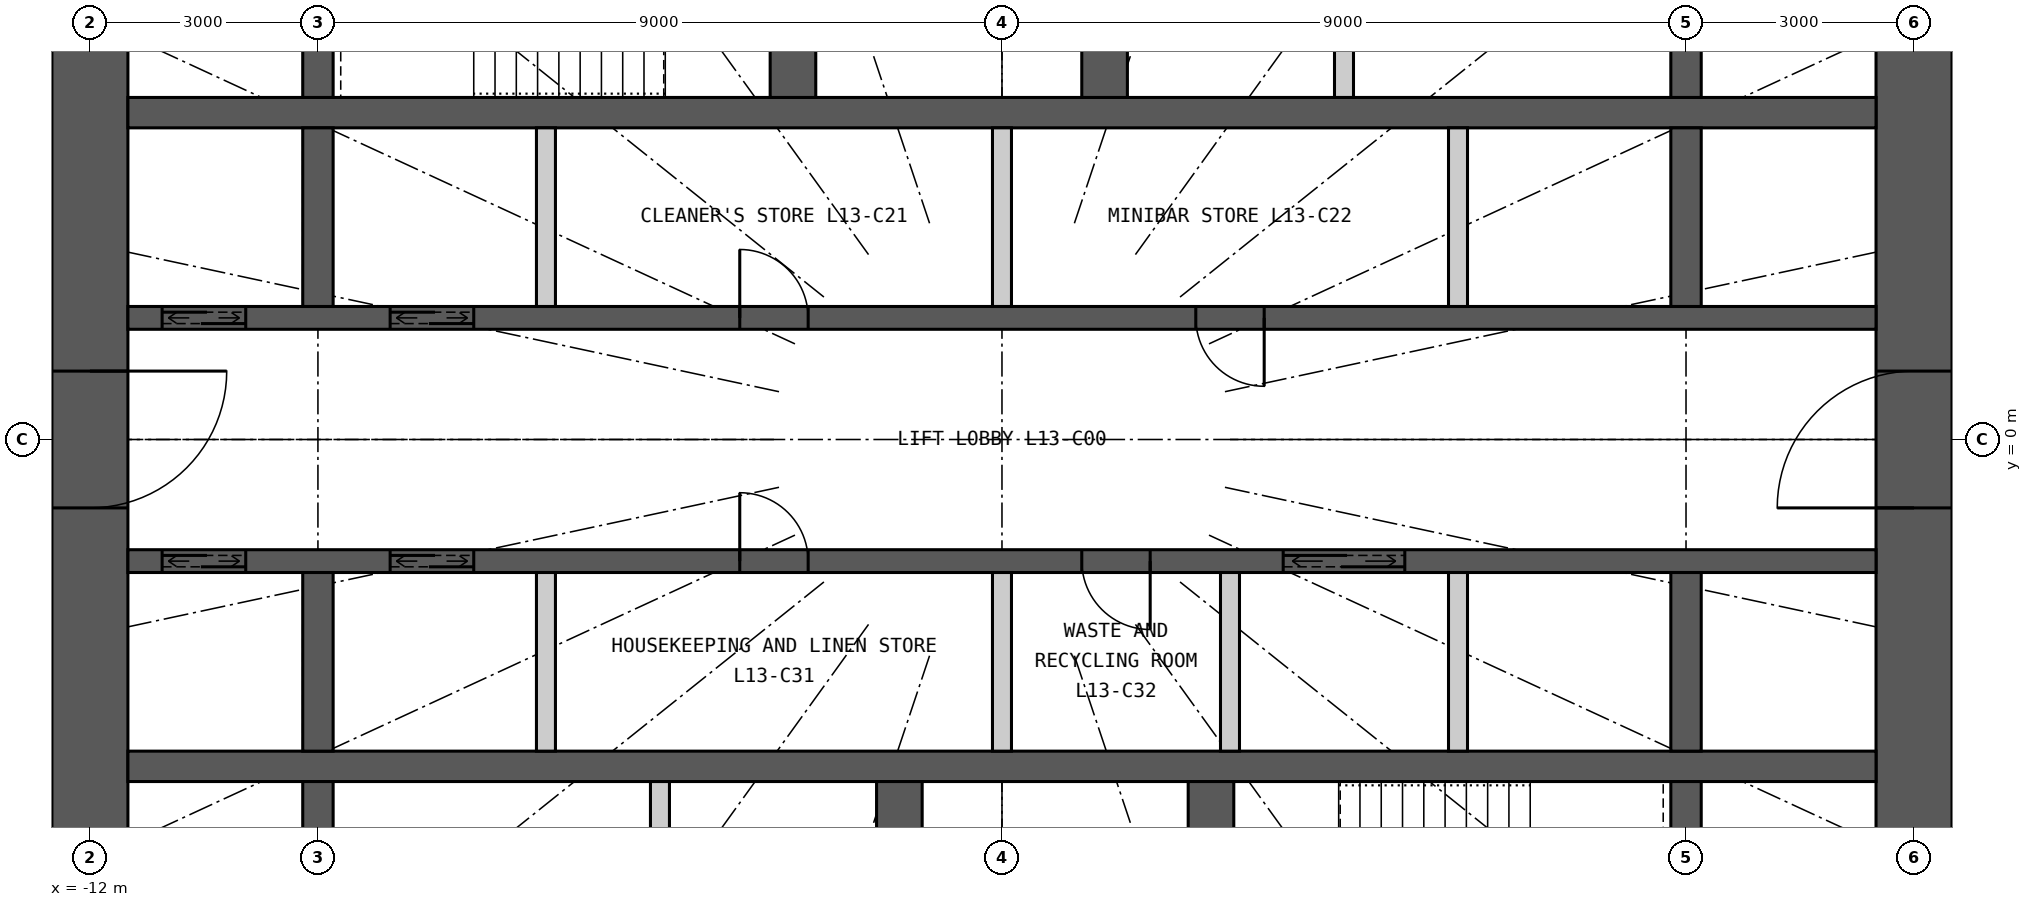
"""IFC4 building model, lengths in metres.
Left out: names, types, materials, properties, quantities, classifications, styles, units other than length and angle.
Written with IfcOpenShell. Run it as: python <this file> out.ifc"""

import sys

from ifc_helpers import new_model, si_unit, direction, frame, frame_2d, origin, place, context, subcontext, project, spatial, rectangle, extrude, element, fill, save


model = new_model("IFC4")
c1 = context("Model", 3, precision=1e-05, world=origin(), true_north=direction((0.0, 1.0)))
c2 = subcontext(c1, "Body", "Model", "MODEL_VIEW")
j1 = project(units=[si_unit("LENGTHUNIT", "METRE"), si_unit("PLANEANGLEUNIT", "RADIAN")], contexts=[c1])
p1 = place(None, origin())
s1 = spatial("IfcSite", under=j1, at=p1, CompositionType="ELEMENT")
p2 = place(p1, origin())
s2 = spatial("IfcBuilding", under=s1, at=p2, CompositionType="ELEMENT")
p3 = place(p2, frame((0.0, 0.0, 57.3)))
s3 = spatial("IfcBuildingStorey", under=s2, at=p3, CompositionType="ELEMENT", Elevation=57.3)
p4 = place(p3, frame((12.0, -7.5, 0.0), z_axis=(0.0, 0.0, 1.0), x_axis=(0.0, 1.0, 0.0)))
e1 = element("IfcWall", 1, at=p4, inside=s3, PredefinedType="SHEAR", context=c2, shape_type="SweptSolid", body=[
    extrude(rectangle(XDim=15.0, YDim=1.0, at=frame_2d((7.5, 0.0))), origin(), (0.0, 0.0, 1.0), 3.3),
])
p5 = place(p4, frame((6.6, 0.0, 0.0)))
e2 = element("IfcOpeningElement", 2, at=p5, cuts=e1, PredefinedType="OPENING", context=c2, shape_type="SweptSolid", body=[
    extrude(rectangle(XDim=1.8, YDim=2.2, at=frame_2d((0.9, 1.1))), frame((0.0, 0.51, 0.0), z_axis=(0.0, -1.0, 0.0), x_axis=(1.0, 0.0, 0.0)), (0.0, 0.0, 1.0), 1.02),
])
p6 = place(p3, frame((-12.0, 7.5, 0.0), z_axis=(0.0, 0.0, 1.0), x_axis=(0.0, -1.0, 0.0)))
e3 = element("IfcWall", 3, at=p6, inside=s3, PredefinedType="SHEAR", context=c2, shape_type="SweptSolid", body=[
    extrude(rectangle(XDim=15.0, YDim=1.0, at=frame_2d((7.5, 0.0))), origin(), (0.0, 0.0, 1.0), 3.3),
])
p7 = place(p6, frame((6.6, 0.0, 0.0)))
e4 = element("IfcOpeningElement", 4, at=p7, cuts=e3, PredefinedType="OPENING", context=c2, shape_type="SweptSolid", body=[
    extrude(rectangle(XDim=1.8, YDim=2.2, at=frame_2d((0.9, 1.1))), frame((0.0, 0.51, 0.0), z_axis=(0.0, -1.0, 0.0), x_axis=(1.0, 0.0, 0.0)), (0.0, 0.0, 1.0), 1.02),
])
p8 = place(p3, frame((-11.5, 4.3, 0.0), z_axis=(0.0, 0.0, 1.0), x_axis=(1.0, 0.0, 0.0)))
e5 = element("IfcWall", 5, at=p8, inside=s3, PredefinedType="SHEAR", context=c2, shape_type="SweptSolid", body=[
    extrude(rectangle(XDim=23.0, YDim=0.4, at=frame_2d((11.5, 0.0))), origin(), (0.0, 0.0, 1.0), 3.3),
])
p9 = place(p3, frame((-11.5, 1.6, 0.0), z_axis=(0.0, 0.0, 1.0), x_axis=(1.0, 0.0, 0.0)))
e6 = element("IfcWall", 6, at=p9, inside=s3, PredefinedType="SHEAR", context=c2, shape_type="SweptSolid", body=[
    extrude(rectangle(XDim=23.0, YDim=0.3, at=frame_2d((11.5, 0.0))), origin(), (0.0, 0.0, 1.0), 3.3),
])
p10 = place(p9, frame((0.45, 0.0, 0.0)))
e7 = element("IfcOpeningElement", 7, at=p10, cuts=e6, PredefinedType="OPENING", context=c2, shape_type="SweptSolid", body=[
    extrude(rectangle(XDim=1.1, YDim=2.2, at=frame_2d((0.55, 1.1))), frame((0.0, 0.16, 0.0), z_axis=(0.0, -1.0, 0.0), x_axis=(1.0, 0.0, 0.0)), (0.0, 0.0, 1.0), 0.32),
])
p11 = place(p9, frame((3.45, 0.0, 0.0)))
e8 = element("IfcOpeningElement", 8, at=p11, cuts=e6, PredefinedType="OPENING", context=c2, shape_type="SweptSolid", body=[
    extrude(rectangle(XDim=1.1, YDim=2.2, at=frame_2d((0.55, 1.1))), frame((0.0, 0.16, 0.0), z_axis=(0.0, -1.0, 0.0), x_axis=(1.0, 0.0, 0.0)), (0.0, 0.0, 1.0), 0.32),
])
p12 = place(p9, frame((8.05, 0.0, 0.0)))
e9 = element("IfcOpeningElement", 9, at=p12, cuts=e6, PredefinedType="OPENING", context=c2, shape_type="SweptSolid", body=[
    extrude(rectangle(XDim=0.9, YDim=2.2, at=frame_2d((0.45, 1.1))), frame((0.0, 0.16, 0.0), z_axis=(0.0, -1.0, 0.0), x_axis=(1.0, 0.0, 0.0)), (0.0, 0.0, 1.0), 0.32),
])
p13 = place(p9, frame((14.05, 0.0, 0.0)))
e10 = element("IfcOpeningElement", 10, at=p13, cuts=e6, PredefinedType="OPENING", context=c2, shape_type="SweptSolid", body=[
    extrude(rectangle(XDim=0.9, YDim=2.2, at=frame_2d((0.45, 1.1))), frame((0.0, 0.16, 0.0), z_axis=(0.0, -1.0, 0.0), x_axis=(1.0, 0.0, 0.0)), (0.0, 0.0, 1.0), 0.32),
])
p14 = place(p3, frame((-11.5, -4.3, 0.0), z_axis=(0.0, 0.0, 1.0), x_axis=(1.0, 0.0, 0.0)))
e11 = element("IfcWall", 11, at=p14, inside=s3, PredefinedType="SHEAR", context=c2, shape_type="SweptSolid", body=[
    extrude(rectangle(XDim=23.0, YDim=0.4, at=frame_2d((11.5, 0.0))), origin(), (0.0, 0.0, 1.0), 3.3),
])
p15 = place(p3, frame((-11.5, -1.6, 0.0), z_axis=(0.0, 0.0, 1.0), x_axis=(1.0, 0.0, 0.0)))
e12 = element("IfcWall", 12, at=p15, inside=s3, PredefinedType="SHEAR", context=c2, shape_type="SweptSolid", body=[
    extrude(rectangle(XDim=23.0, YDim=0.3, at=frame_2d((11.5, 0.0))), origin(), (0.0, 0.0, 1.0), 3.3),
])
p16 = place(p15, frame((0.45, 0.0, 0.0)))
e13 = element("IfcOpeningElement", 13, at=p16, cuts=e12, PredefinedType="OPENING", context=c2, shape_type="SweptSolid", body=[
    extrude(rectangle(XDim=1.1, YDim=2.2, at=frame_2d((0.55, 1.1))), frame((0.0, 0.16, 0.0), z_axis=(0.0, -1.0, 0.0), x_axis=(1.0, 0.0, 0.0)), (0.0, 0.0, 1.0), 0.32),
])
p17 = place(p15, frame((3.45, 0.0, 0.0)))
e14 = element("IfcOpeningElement", 14, at=p17, cuts=e12, PredefinedType="OPENING", context=c2, shape_type="SweptSolid", body=[
    extrude(rectangle(XDim=1.1, YDim=2.2, at=frame_2d((0.55, 1.1))), frame((0.0, 0.16, 0.0), z_axis=(0.0, -1.0, 0.0), x_axis=(1.0, 0.0, 0.0)), (0.0, 0.0, 1.0), 0.32),
])
p18 = place(p15, frame((15.2, 0.0, 0.0)))
e15 = element("IfcOpeningElement", 15, at=p18, cuts=e12, PredefinedType="OPENING", context=c2, shape_type="SweptSolid", body=[
    extrude(rectangle(XDim=1.6, YDim=2.4, at=frame_2d((0.8, 1.2))), frame((0.0, 0.16, 0.0), z_axis=(0.0, -1.0, 0.0), x_axis=(1.0, 0.0, 0.0)), (0.0, 0.0, 1.0), 0.32),
])
p19 = place(p15, frame((8.05, 0.0, 0.0)))
e16 = element("IfcOpeningElement", 16, at=p19, cuts=e12, PredefinedType="OPENING", context=c2, shape_type="SweptSolid", body=[
    extrude(rectangle(XDim=0.9, YDim=2.2, at=frame_2d((0.45, 1.1))), frame((0.0, 0.16, 0.0), z_axis=(0.0, -1.0, 0.0), x_axis=(1.0, 0.0, 0.0)), (0.0, 0.0, 1.0), 0.32),
])
p20 = place(p15, frame((12.55, 0.0, 0.0)))
e17 = element("IfcOpeningElement", 17, at=p20, cuts=e12, PredefinedType="OPENING", context=c2, shape_type="SweptSolid", body=[
    extrude(rectangle(XDim=0.9, YDim=2.2, at=frame_2d((0.45, 1.1))), frame((0.0, 0.16, 0.0), z_axis=(0.0, -1.0, 0.0), x_axis=(1.0, 0.0, 0.0)), (0.0, 0.0, 1.0), 0.32),
])
p21 = place(p3, frame((-9.0, 4.5, 0.0), z_axis=(0.0, 0.0, 1.0), x_axis=(0.0, 1.0, 0.0)))
e18 = element("IfcWall", 18, at=p21, inside=s3, PredefinedType="SHEAR", context=c2, shape_type="SweptSolid", body=[
    extrude(rectangle(XDim=3.0, YDim=0.4, at=frame_2d((1.5, 0.0))), origin(), (0.0, 0.0, 1.0), 3.3),
])
for number, where, z_axis, x_axis in (
    (19, (-9.0, 1.75, 0.0), (0.0, 0.0, 1.0), (0.0, 1.0, 0.0)),
    (20, (-9.0, -4.1, 0.0), (0.0, 0.0, 1.0), (0.0, 1.0, 0.0)),
):
    element("IfcWall", number, at=place(p3, frame(where, z_axis=z_axis, x_axis=x_axis)), inside=s3, PredefinedType="SHEAR", context=c2, shape_type="SweptSolid", body=[
        extrude(rectangle(XDim=2.35, YDim=0.4, at=frame_2d((1.175, 0.0))), origin(), (0.0, 0.0, 1.0), 3.3),
    ])
for number, where, z_axis, x_axis in (
    (21, (-9.0, -7.5, 0.0), (0.0, 0.0, 1.0), (0.0, 1.0, 0.0)),
    (22, (9.0, 4.5, 0.0), (0.0, 0.0, 1.0), (0.0, 1.0, 0.0)),
):
    element("IfcWall", number, at=place(p3, frame(where, z_axis=z_axis, x_axis=x_axis)), inside=s3, PredefinedType="SHEAR", context=c2, shape_type="SweptSolid", body=[
        extrude(rectangle(XDim=3.0, YDim=0.4, at=frame_2d((1.5, 0.0))), origin(), (0.0, 0.0, 1.0), 3.3),
    ])
for number, where, z_axis, x_axis in (
    (23, (9.0, 1.75, 0.0), (0.0, 0.0, 1.0), (0.0, 1.0, 0.0)),
    (24, (9.0, -4.1, 0.0), (0.0, 0.0, 1.0), (0.0, 1.0, 0.0)),
):
    element("IfcWall", number, at=place(p3, frame(where, z_axis=z_axis, x_axis=x_axis)), inside=s3, PredefinedType="SHEAR", context=c2, shape_type="SweptSolid", body=[
        extrude(rectangle(XDim=2.35, YDim=0.4, at=frame_2d((1.175, 0.0))), origin(), (0.0, 0.0, 1.0), 3.3),
    ])
p22 = place(p3, frame((9.0, -7.5, 0.0), z_axis=(0.0, 0.0, 1.0), x_axis=(0.0, 1.0, 0.0)))
e25 = element("IfcWall", 25, at=p22, inside=s3, PredefinedType="SHEAR", context=c2, shape_type="SweptSolid", body=[
    extrude(rectangle(XDim=3.0, YDim=0.4, at=frame_2d((1.5, 0.0))), origin(), (0.0, 0.0, 1.0), 3.3),
])
p23 = place(p3, frame((-2.75, 4.5, 0.0), z_axis=(0.0, 0.0, 1.0), x_axis=(0.0, 1.0, 0.0)))
e26 = element("IfcWall", 26, at=p23, inside=s3, PredefinedType="SHEAR", context=c2, shape_type="SweptSolid", body=[
    extrude(rectangle(XDim=3.0, YDim=0.6, at=frame_2d((1.5, 0.0))), origin(), (0.0, 0.0, 1.0), 3.3),
])
p24 = place(p23, frame((0.925, 0.0, 0.0)))
e27 = element("IfcOpeningElement", 27, at=p24, cuts=e26, PredefinedType="OPENING", context=c2, shape_type="SweptSolid", body=[
    extrude(rectangle(XDim=1.1, YDim=2.2, at=frame_2d((0.55, 1.1))), frame((0.0, 0.31, 0.0), z_axis=(0.0, -1.0, 0.0), x_axis=(1.0, 0.0, 0.0)), (0.0, 0.0, 1.0), 0.62),
])
p25 = place(p3, frame((1.35, 4.5, 0.0), z_axis=(0.0, 0.0, 1.0), x_axis=(0.0, 1.0, 0.0)))
e28 = element("IfcWall", 28, at=p25, inside=s3, PredefinedType="SHEAR", context=c2, shape_type="SweptSolid", body=[
    extrude(rectangle(XDim=3.0, YDim=0.6, at=frame_2d((1.5, 0.0))), origin(), (0.0, 0.0, 1.0), 3.3),
])
p26 = place(p25, frame((0.95, 0.0, 0.0)))
e29 = element("IfcOpeningElement", 29, at=p26, cuts=e28, PredefinedType="OPENING", context=c2, shape_type="SweptSolid", body=[
    extrude(rectangle(XDim=1.1, YDim=2.2, at=frame_2d((0.55, 1.1))), frame((0.0, 0.31, 0.0), z_axis=(0.0, -1.0, 0.0), x_axis=(1.0, 0.0, 0.0)), (0.0, 0.0, 1.0), 0.62),
])
p27 = place(p3, frame((4.5, 4.5, 0.0), z_axis=(0.0, 0.0, 1.0), x_axis=(0.0, 1.0, 0.0)))
e30 = element("IfcWall", 30, at=p27, inside=s3, PredefinedType="PARTITIONING", context=c2, shape_type="SweptSolid", body=[
    extrude(rectangle(XDim=3.0, YDim=0.25, at=frame_2d((1.5, 0.0))), origin(), (0.0, 0.0, 1.0), 3.3),
])
p28 = place(p3, frame((2.75, -7.5, 0.0), z_axis=(0.0, 0.0, 1.0), x_axis=(0.0, 1.0, 0.0)))
e31 = element("IfcWall", 31, at=p28, inside=s3, PredefinedType="SHEAR", context=c2, shape_type="SweptSolid", body=[
    extrude(rectangle(XDim=3.0, YDim=0.6, at=frame_2d((1.5, 0.0))), origin(), (0.0, 0.0, 1.0), 3.3),
])
p29 = place(p28, frame((0.975, 0.0, 0.0)))
e32 = element("IfcOpeningElement", 32, at=p29, cuts=e31, PredefinedType="OPENING", context=c2, shape_type="SweptSolid", body=[
    extrude(rectangle(XDim=1.1, YDim=2.2, at=frame_2d((0.55, 1.1))), frame((0.0, 0.31, 0.0), z_axis=(0.0, -1.0, 0.0), x_axis=(1.0, 0.0, 0.0)), (0.0, 0.0, 1.0), 0.62),
])
p30 = place(p3, frame((-1.35, -7.5, 0.0), z_axis=(0.0, 0.0, 1.0), x_axis=(0.0, 1.0, 0.0)))
e33 = element("IfcWall", 33, at=p30, inside=s3, PredefinedType="SHEAR", context=c2, shape_type="SweptSolid", body=[
    extrude(rectangle(XDim=3.0, YDim=0.6, at=frame_2d((1.5, 0.0))), origin(), (0.0, 0.0, 1.0), 3.3),
])
p31 = place(p30, frame((0.95, 0.0, 0.0)))
e34 = element("IfcOpeningElement", 34, at=p31, cuts=e33, PredefinedType="OPENING", context=c2, shape_type="SweptSolid", body=[
    extrude(rectangle(XDim=1.1, YDim=2.2, at=frame_2d((0.55, 1.1))), frame((0.0, 0.31, 0.0), z_axis=(0.0, -1.0, 0.0), x_axis=(1.0, 0.0, 0.0)), (0.0, 0.0, 1.0), 0.62),
])
p32 = place(p3, frame((-4.5, -7.5, 0.0), z_axis=(0.0, 0.0, 1.0), x_axis=(0.0, 1.0, 0.0)))
e35 = element("IfcWall", 35, at=p32, inside=s3, PredefinedType="PARTITIONING", context=c2, shape_type="SweptSolid", body=[
    extrude(rectangle(XDim=3.0, YDim=0.25, at=frame_2d((1.5, 0.0))), origin(), (0.0, 0.0, 1.0), 3.3),
])
for number, where, z_axis, x_axis in (
    (36, (-6.0, 1.75, 0.0), (0.0, 0.0, 1.0), (0.0, 1.0, 0.0)),
    (37, (0.0, 1.75, 0.0), (0.0, 0.0, 1.0), (0.0, 1.0, 0.0)),
    (38, (6.0, 1.75, 0.0), (0.0, 0.0, 1.0), (0.0, 1.0, 0.0)),
    (39, (-6.0, -4.1, 0.0), (0.0, 0.0, 1.0), (0.0, 1.0, 0.0)),
    (40, (0.0, -4.1, 0.0), (0.0, 0.0, 1.0), (0.0, 1.0, 0.0)),
    (41, (3.0, -4.1, 0.0), (0.0, 0.0, 1.0), (0.0, 1.0, 0.0)),
    (42, (6.0, -4.1, 0.0), (0.0, 0.0, 1.0), (0.0, 1.0, 0.0)),
):
    element("IfcWall", number, at=place(p3, frame(where, z_axis=z_axis, x_axis=x_axis)), inside=s3, PredefinedType="PARTITIONING", context=c2, shape_type="SweptSolid", body=[
        extrude(rectangle(XDim=2.35, YDim=0.25, at=frame_2d((1.175, 0.0))), origin(), (0.0, 0.0, 1.0), 3.3),
    ])
p33 = place(p10, origin())
e43 = element("IfcDoor", 43, at=p33, inside=s3, OperationType="DOUBLE_DOOR_SLIDING", PredefinedType="DOOR", context=c2, shape_type="SweptSolid", body=[
    extrude(rectangle(XDim=1.1, YDim=2.2, at=frame_2d((0.55, 1.1))), frame((0.0, 0.025, 0.0), z_axis=(0.0, -1.0, 0.0), x_axis=(1.0, 0.0, 0.0)), (0.0, 0.0, 1.0), 0.05),
])
fill(e7, e43)
p34 = place(p11, origin())
e44 = element("IfcDoor", 44, at=p34, inside=s3, OperationType="DOUBLE_DOOR_SLIDING", PredefinedType="DOOR", context=c2, shape_type="SweptSolid", body=[
    extrude(rectangle(XDim=1.1, YDim=2.2, at=frame_2d((0.55, 1.1))), frame((0.0, 0.025, 0.0), z_axis=(0.0, -1.0, 0.0), x_axis=(1.0, 0.0, 0.0)), (0.0, 0.0, 1.0), 0.05),
])
fill(e8, e44)
p35 = place(p16, origin())
e45 = element("IfcDoor", 45, at=p35, inside=s3, OperationType="DOUBLE_DOOR_SLIDING", PredefinedType="DOOR", context=c2, shape_type="SweptSolid", body=[
    extrude(rectangle(XDim=1.1, YDim=2.2, at=frame_2d((0.55, 1.1))), frame((0.0, 0.025, 0.0), z_axis=(0.0, -1.0, 0.0), x_axis=(1.0, 0.0, 0.0)), (0.0, 0.0, 1.0), 0.05),
])
fill(e13, e45)
p36 = place(p17, origin())
e46 = element("IfcDoor", 46, at=p36, inside=s3, OperationType="DOUBLE_DOOR_SLIDING", PredefinedType="DOOR", context=c2, shape_type="SweptSolid", body=[
    extrude(rectangle(XDim=1.1, YDim=2.2, at=frame_2d((0.55, 1.1))), frame((0.0, 0.025, 0.0), z_axis=(0.0, -1.0, 0.0), x_axis=(1.0, 0.0, 0.0)), (0.0, 0.0, 1.0), 0.05),
])
fill(e14, e46)
p37 = place(p18, origin())
e47 = element("IfcDoor", 47, at=p37, inside=s3, OperationType="DOUBLE_DOOR_SLIDING", PredefinedType="DOOR", context=c2, shape_type="SweptSolid", body=[
    extrude(rectangle(XDim=1.6, YDim=2.4, at=frame_2d((0.8, 1.2))), frame((0.0, 0.025, 0.0), z_axis=(0.0, -1.0, 0.0), x_axis=(1.0, 0.0, 0.0)), (0.0, 0.0, 1.0), 0.05),
])
fill(e15, e47)
p38 = place(p12, origin())
e48 = element("IfcDoor", 48, at=p38, inside=s3, OperationType="SINGLE_SWING_LEFT", PredefinedType="DOOR", context=c2, shape_type="SweptSolid", body=[
    extrude(rectangle(XDim=0.9, YDim=2.2, at=frame_2d((0.45, 1.1))), frame((0.0, 0.025, 0.0), z_axis=(0.0, -1.0, 0.0), x_axis=(1.0, 0.0, 0.0)), (0.0, 0.0, 1.0), 0.05),
])
fill(e9, e48)
p39 = place(p13, origin())
e49 = element("IfcDoor", 49, at=p39, inside=s3, OperationType="SINGLE_SWING_RIGHT", PredefinedType="DOOR", context=c2, shape_type="SweptSolid", body=[
    extrude(rectangle(XDim=0.9, YDim=2.2, at=frame_2d((0.45, 1.1))), frame((0.0, 0.025, 0.0), z_axis=(0.0, -1.0, 0.0), x_axis=(1.0, 0.0, 0.0)), (0.0, 0.0, 1.0), 0.05),
])
fill(e10, e49)
p40 = place(p19, origin())
e50 = element("IfcDoor", 50, at=p40, inside=s3, OperationType="SINGLE_SWING_LEFT", PredefinedType="DOOR", context=c2, shape_type="SweptSolid", body=[
    extrude(rectangle(XDim=0.9, YDim=2.2, at=frame_2d((0.45, 1.1))), frame((0.0, 0.025, 0.0), z_axis=(0.0, -1.0, 0.0), x_axis=(1.0, 0.0, 0.0)), (0.0, 0.0, 1.0), 0.05),
])
fill(e16, e50)
p41 = place(p20, origin())
e51 = element("IfcDoor", 51, at=p41, inside=s3, OperationType="SINGLE_SWING_RIGHT", PredefinedType="DOOR", context=c2, shape_type="SweptSolid", body=[
    extrude(rectangle(XDim=0.9, YDim=2.2, at=frame_2d((0.45, 1.1))), frame((0.0, 0.025, 0.0), z_axis=(0.0, -1.0, 0.0), x_axis=(1.0, 0.0, 0.0)), (0.0, 0.0, 1.0), 0.05),
])
fill(e17, e51)
p42 = place(p5, origin())
e52 = element("IfcDoor", 52, at=p42, inside=s3, OperationType="DOUBLE_DOOR_DOUBLE_SWING", PredefinedType="DOOR", context=c2, shape_type="SweptSolid", body=[
    extrude(rectangle(XDim=1.8, YDim=2.2, at=frame_2d((0.9, 1.1))), frame((0.0, 0.025, 0.0), z_axis=(0.0, -1.0, 0.0), x_axis=(1.0, 0.0, 0.0)), (0.0, 0.0, 1.0), 0.05),
])
fill(e2, e52)
p43 = place(p7, origin())
e53 = element("IfcDoor", 53, at=p43, inside=s3, OperationType="DOUBLE_DOOR_DOUBLE_SWING", PredefinedType="DOOR", context=c2, shape_type="SweptSolid", body=[
    extrude(rectangle(XDim=1.8, YDim=2.2, at=frame_2d((0.9, 1.1))), frame((0.0, 0.025, 0.0), z_axis=(0.0, -1.0, 0.0), x_axis=(1.0, 0.0, 0.0)), (0.0, 0.0, 1.0), 0.05),
])
fill(e4, e53)
save(model, sys.argv[1])
